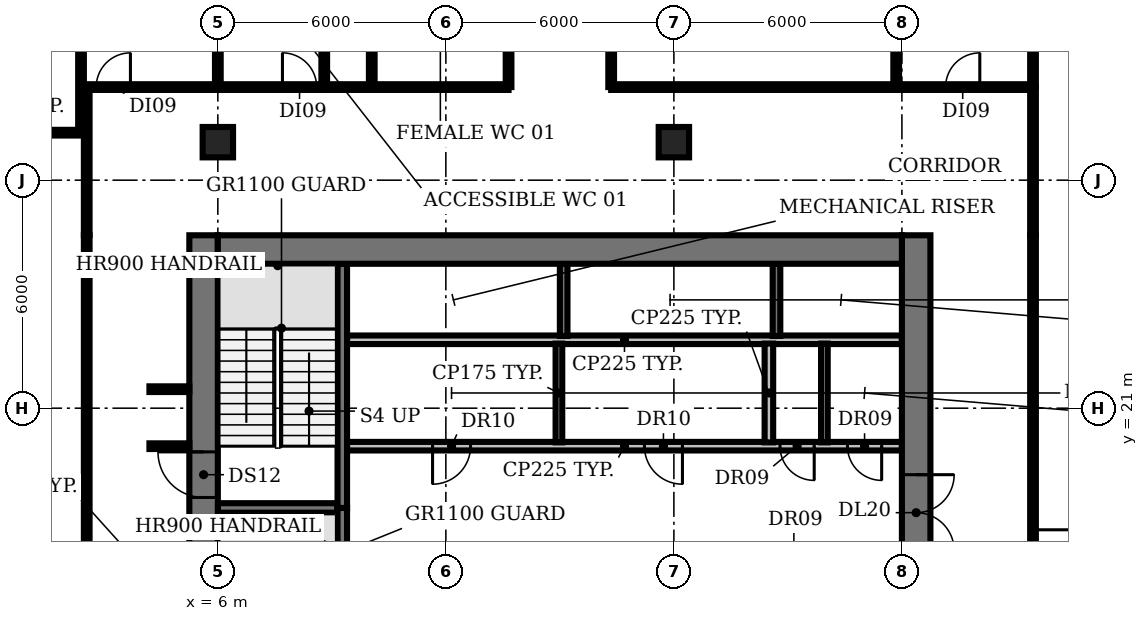
"""IFC4 building model, lengths in metres.
Left out: names, types, materials, properties, quantities, classifications, styles, units other than length and angle.
Written with IfcOpenShell. Run it as: python <this file> out.ifc"""

import sys

from ifc_helpers import new_model, si_unit, direction, frame, frame_2d, origin, origin_2d, place, context, subcontext, project, spatial, rectangle, extrude, element, fill, save


model = new_model("IFC4")
c1 = context("Model", 3, precision=1e-05, world=origin(), true_north=direction((0.0, 1.0)))
c2 = subcontext(c1, "Body", "Model", "MODEL_VIEW")
j1 = project(units=[si_unit("LENGTHUNIT", "METRE"), si_unit("PLANEANGLEUNIT", "RADIAN")], contexts=[c1])
p1 = place(None, origin())
s1 = spatial("IfcSite", under=j1, at=p1, CompositionType="ELEMENT")
p2 = place(p1, origin())
s2 = spatial("IfcBuilding", under=s1, at=p2, CompositionType="ELEMENT")
p3 = place(p2, frame((0.0, 0.0, 113.0)))
s3 = spatial("IfcBuildingStorey", under=s2, at=p3, CompositionType="ELEMENT", Elevation=113.0)
for number, where, z_axis, x_axis in (
    (1, (6.0, 28.0, 0.0), (0.0, 0.0, 1.0), (1.0, 0.0, 0.0)),
    (2, (18.0, 28.0, 0.0), (0.0, 0.0, 1.0), (1.0, 0.0, 0.0)),
):
    element("IfcColumn", number, at=place(p3, frame(where, z_axis=z_axis, x_axis=x_axis)), inside=s3, PredefinedType="COLUMN", context=c2, shape_type="SweptSolid", body=[
        extrude(rectangle(XDim=0.8, YDim=0.8, at=origin_2d()), origin(), (0.0, 0.0, 1.0), 3.85),
    ])
p4 = place(p3, frame((6.0, 18.375, 0.0), z_axis=(0.0, 0.0, 1.0), x_axis=(1.0, 0.0, 0.0)))
e3 = element("IfcWall", 3, at=p4, inside=s3, PredefinedType="SHEAR", context=c2, shape_type="SweptSolid", body=[
    extrude(rectangle(XDim=3.15, YDim=0.25, at=frame_2d((1.575, 0.0))), origin(), (0.0, 0.0, 1.0), 3.85),
])
p5 = place(p3, frame((24.0, 20.0, 0.0), z_axis=(0.0, 0.0, 1.0), x_axis=(-1.0, 0.0, 0.0)))
e4 = element("IfcWall", 4, at=p5, inside=s3, PredefinedType="PARTITIONING", context=c2, shape_type="SweptSolid", body=[
    extrude(rectangle(XDim=14.6, YDim=0.225, at=frame_2d((7.3, 0.0))), origin(), (0.0, 0.0, 1.0), 3.85),
])
p6 = place(p5, frame((11.35, 0.0, 0.0)))
e5 = element("IfcOpeningElement", 5, at=p6, cuts=e4, PredefinedType="OPENING", context=c2, shape_type="SweptSolid", body=[
    extrude(rectangle(XDim=1.0, YDim=2.1, at=frame_2d((0.5, 1.05))), frame((0.0, 0.123, 0.0), z_axis=(0.0, -1.0, 0.0), x_axis=(1.0, 0.0, 0.0)), (0.0, 0.0, 1.0), 0.245),
])
p7 = place(p5, frame((5.775, 0.0, 0.0)))
e6 = element("IfcOpeningElement", 6, at=p7, cuts=e4, PredefinedType="OPENING", context=c2, shape_type="SweptSolid", body=[
    extrude(rectangle(XDim=1.0, YDim=2.1, at=frame_2d((0.5, 1.05))), frame((0.0, 0.123, 0.0), z_axis=(0.0, -1.0, 0.0), x_axis=(1.0, 0.0, 0.0)), (0.0, 0.0, 1.0), 0.245),
])
p8 = place(p5, frame((2.308, 0.0, 0.0)))
e7 = element("IfcOpeningElement", 7, at=p8, cuts=e4, PredefinedType="OPENING", context=c2, shape_type="SweptSolid", body=[
    extrude(rectangle(XDim=0.9, YDim=2.1, at=frame_2d((0.45, 1.05))), frame((0.0, 0.123, 0.0), z_axis=(0.0, -1.0, 0.0), x_axis=(1.0, 0.0, 0.0)), (0.0, 0.0, 1.0), 0.245),
])
p9 = place(p5, frame((0.532, 0.0, 0.0)))
e8 = element("IfcOpeningElement", 8, at=p9, cuts=e4, PredefinedType="OPENING", context=c2, shape_type="SweptSolid", body=[
    extrude(rectangle(XDim=0.9, YDim=2.1, at=frame_2d((0.45, 1.05))), frame((0.0, 0.123, 0.0), z_axis=(0.0, -1.0, 0.0), x_axis=(1.0, 0.0, 0.0)), (0.0, 0.0, 1.0), 0.245),
])
p10 = place(p3, frame((9.4, 22.8, 0.0), z_axis=(0.0, 0.0, 1.0), x_axis=(1.0, 0.0, 0.0)))
e9 = element("IfcWall", 9, at=p10, inside=s3, PredefinedType="PARTITIONING", context=c2, shape_type="SweptSolid", body=[
    extrude(rectangle(XDim=14.6, YDim=0.225, at=frame_2d((7.3, 0.0))), origin(), (0.0, 0.0, 1.0), 3.85),
])
p11 = place(p3, frame((9.275, 18.375, 0.0), z_axis=(0.0, 0.0, 1.0), x_axis=(0.0, -1.0, 0.0)))
e10 = element("IfcWall", 10, at=p11, inside=s3, PredefinedType="SHEAR", context=c2, shape_type="SweptSolid", body=[
    extrude(rectangle(XDim=6.55, YDim=0.25, at=frame_2d((3.275, 0.0))), origin(), (0.0, 0.0, 1.0), 3.85),
])
p12 = place(p11, frame((5.075, 0.0, 0.0)))
e11 = element("IfcOpeningElement", 11, at=p12, cuts=e10, PredefinedType="OPENING", context=c2, shape_type="SweptSolid", body=[
    extrude(rectangle(XDim=1.0, YDim=2.1, at=frame_2d((0.5, 1.05))), frame((0.0, 0.135, 0.0), z_axis=(0.0, -1.0, 0.0), x_axis=(1.0, 0.0, 0.0)), (0.0, 0.0, 1.0), 0.27),
])
p13 = place(p3, frame((9.275, 18.375, 0.0), z_axis=(0.0, 0.0, 1.0), x_axis=(0.0, 1.0, 0.0)))
e12 = element("IfcWall", 12, at=p13, inside=s3, PredefinedType="SHEAR", context=c2, shape_type="SweptSolid", body=[
    extrude(rectangle(XDim=6.425, YDim=0.25, at=frame_2d((3.212, 0.0))), origin(), (0.0, 0.0, 1.0), 3.85),
])
p14 = place(p3, frame((14.975, 20.1, 0.0), z_axis=(0.0, 0.0, 1.0), x_axis=(0.0, 1.0, 0.0)))
e13 = element("IfcWall", 13, at=p14, inside=s3, PredefinedType="PARTITIONING", context=c2, shape_type="SweptSolid", body=[
    extrude(rectangle(XDim=2.6, YDim=0.175, at=frame_2d((1.3, 0.0))), origin(), (0.0, 0.0, 1.0), 3.85),
])
p15 = place(p3, frame((15.1, 22.9, 0.0), z_axis=(0.0, 0.0, 1.0), x_axis=(0.0, 1.0, 0.0)))
e14 = element("IfcWall", 14, at=p15, inside=s3, PredefinedType="SHEAR", context=c2, shape_type="SweptSolid", body=[
    extrude(rectangle(XDim=1.9, YDim=0.2, at=frame_2d((0.95, 0.0))), origin(), (0.0, 0.0, 1.0), 3.85),
])
p16 = place(p3, frame((20.5, 20.1, 0.0), z_axis=(0.0, 0.0, 1.0), x_axis=(0.0, 1.0, 0.0)))
e15 = element("IfcWall", 15, at=p16, inside=s3, PredefinedType="PARTITIONING", context=c2, shape_type="SweptSolid", body=[
    extrude(rectangle(XDim=2.6, YDim=0.225, at=frame_2d((1.3, 0.0))), origin(), (0.0, 0.0, 1.0), 3.85),
])
p17 = place(p3, frame((20.7, 22.9, 0.0), z_axis=(0.0, 0.0, 1.0), x_axis=(0.0, 1.0, 0.0)))
e16 = element("IfcWall", 16, at=p17, inside=s3, PredefinedType="SHEAR", context=c2, shape_type="SweptSolid", body=[
    extrude(rectangle(XDim=1.9, YDim=0.2, at=frame_2d((0.95, 0.0))), origin(), (0.0, 0.0, 1.0), 3.85),
])
p18 = place(p3, frame((21.96, 20.1, 0.0), z_axis=(0.0, 0.0, 1.0), x_axis=(0.0, 1.0, 0.0)))
e17 = element("IfcWall", 17, at=p18, inside=s3, PredefinedType="PARTITIONING", context=c2, shape_type="SweptSolid", body=[
    extrude(rectangle(XDim=2.6, YDim=0.175, at=frame_2d((1.3, 0.0))), origin(), (0.0, 0.0, 1.0), 3.85),
])
p19 = place(p3, frame((5.625, 4.47, 0.0), z_axis=(0.0, 0.0, 1.0), x_axis=(0.0, 1.0, 0.0)))
e18 = element("IfcWall", 18, at=p19, inside=s3, PredefinedType="SHEAR", context=c2, shape_type="SweptSolid", body=[
    extrude(rectangle(XDim=21.08, YDim=0.75, at=frame_2d((10.54, 0.0))), origin(), (0.0, 0.0, 1.0), 3.85),
])
p20 = place(p19, frame((1.18, 0.0, 0.0)))
e19 = element("IfcOpeningElement", 19, at=p20, cuts=e18, PredefinedType="OPENING", context=c2, shape_type="SweptSolid", body=[
    extrude(rectangle(XDim=1.5, YDim=2.1, at=frame_2d((0.75, 1.05))), frame((0.0, 0.385, 0.0), z_axis=(0.0, -1.0, 0.0), x_axis=(1.0, 0.0, 0.0)), (0.0, 0.0, 1.0), 0.77),
])
p21 = place(p19, frame((7.63, 0.0, 0.0)))
e20 = element("IfcOpeningElement", 20, at=p21, cuts=e18, PredefinedType="OPENING", context=c2, shape_type="SweptSolid", body=[
    extrude(rectangle(XDim=1.2, YDim=2.1, at=frame_2d((0.6, 1.05))), frame((0.0, 0.385, 0.0), z_axis=(0.0, -1.0, 0.0), x_axis=(1.0, 0.0, 0.0)), (0.0, 0.0, 1.0), 0.77),
])
p22 = place(p19, frame((14.18, 0.0, 0.0)))
e21 = element("IfcOpeningElement", 21, at=p22, cuts=e18, PredefinedType="OPENING", context=c2, shape_type="SweptSolid", body=[
    extrude(rectangle(XDim=1.2, YDim=2.1, at=frame_2d((0.6, 1.05))), frame((0.0, 0.385, 0.0), z_axis=(0.0, -1.0, 0.0), x_axis=(1.0, 0.0, 0.0)), (0.0, 0.0, 1.0), 0.77),
])
p23 = place(p3, frame((24.375, 25.55, 0.0), z_axis=(0.0, 0.0, 1.0), x_axis=(0.0, -1.0, 0.0)))
e22 = element("IfcWall", 22, at=p23, inside=s3, PredefinedType="SHEAR", context=c2, shape_type="SweptSolid", body=[
    extrude(rectangle(XDim=21.13, YDim=0.75, at=frame_2d((10.565, 0.0))), origin(), (0.0, 0.0, 1.0), 3.85),
])
p24 = place(p23, frame((18.4, 0.0, 0.0)))
e23 = element("IfcOpeningElement", 23, at=p24, cuts=e22, PredefinedType="OPENING", context=c2, shape_type="SweptSolid", body=[
    extrude(rectangle(XDim=1.5, YDim=2.1, at=frame_2d((0.75, 1.05))), frame((0.0, 0.385, 0.0), z_axis=(0.0, -1.0, 0.0), x_axis=(1.0, 0.0, 0.0)), (0.0, 0.0, 1.0), 0.77),
])
p25 = place(p23, frame((12.3, 0.0, 0.0)))
e24 = element("IfcOpeningElement", 24, at=p25, cuts=e22, PredefinedType="OPENING", context=c2, shape_type="SweptSolid", body=[
    extrude(rectangle(XDim=0.9, YDim=2.1, at=frame_2d((0.45, 1.05))), frame((0.0, 0.385, 0.0), z_axis=(0.0, -1.0, 0.0), x_axis=(1.0, 0.0, 0.0)), (0.0, 0.0, 1.0), 0.77),
])
p26 = place(p23, frame((6.3, 0.0, 0.0)))
e25 = element("IfcOpeningElement", 25, at=p26, cuts=e22, PredefinedType="OPENING", context=c2, shape_type="SweptSolid", body=[
    extrude(rectangle(XDim=2.0, YDim=2.1, at=frame_2d((1.0, 1.05))), frame((0.0, 0.385, 0.0), z_axis=(0.0, -1.0, 0.0), x_axis=(1.0, 0.0, 0.0)), (0.0, 0.0, 1.0), 0.77),
])
p27 = place(p3, frame((6.0, 25.175, 0.0), z_axis=(0.0, 0.0, 1.0), x_axis=(1.0, 0.0, 0.0)))
e26 = element("IfcWall", 26, at=p27, inside=s3, PredefinedType="SHEAR", context=c2, shape_type="SweptSolid", body=[
    extrude(rectangle(XDim=18.0, YDim=0.75, at=frame_2d((9.0, 0.0))), origin(), (0.0, 0.0, 1.0), 3.85),
])
p28 = place(p3, frame((-1.02, 28.25, 0.0), z_axis=(0.0, 0.0, 1.0), x_axis=(1.0, 0.0, 0.0)))
e27 = element("IfcWall", 27, at=p28, inside=s3, PredefinedType="PARTITIONING", context=c2, shape_type="SweptSolid", body=[
    extrude(rectangle(XDim=3.42, YDim=0.15, at=frame_2d((1.71, 0.0))), origin(), (0.0, 0.0, 1.0), 2.83),
])
p29 = place(p3, frame((2.4, 28.25, 0.0), z_axis=(0.0, 0.0, 1.0), x_axis=(0.0, 1.0, 0.0)))
e28 = element("IfcWall", 28, at=p29, inside=s3, PredefinedType="PARTITIONING", context=c2, shape_type="SweptSolid", body=[
    extrude(rectangle(XDim=6.0, YDim=0.15, at=frame_2d((3.0, 0.0))), origin(), (0.0, 0.0, 1.0), 2.83),
])
p30 = place(p3, frame((2.55, 6.07, 0.0), z_axis=(0.0, 0.0, 1.0), x_axis=(0.0, 1.0, 0.0)))
e29 = element("IfcWall", 29, at=p30, inside=s3, PredefinedType="PARTITIONING", context=c2, shape_type="SweptSolid", body=[
    extrude(rectangle(XDim=19.48, YDim=0.15, at=frame_2d((9.74, 0.0))), origin(), (0.0, 0.0, 1.0), 2.83),
])
p31 = place(p30, frame((7.58, 0.0, 0.0)))
e30 = element("IfcOpeningElement", 30, at=p31, cuts=e29, PredefinedType="OPENING", context=c2, shape_type="SweptSolid", body=[
    extrude(rectangle(XDim=1.2, YDim=2.1, at=frame_2d((0.6, 1.05))), frame((0.0, 0.085, 0.0), z_axis=(0.0, -1.0, 0.0), x_axis=(1.0, 0.0, 0.0)), (0.0, 0.0, 1.0), 0.17),
])
p32 = place(p3, frame((2.55, 25.55, 0.0), z_axis=(0.0, 0.0, 1.0), x_axis=(0.0, 1.0, 0.0)))
e31 = element("IfcWall", 31, at=p32, inside=s3, PredefinedType="PARTITIONING", context=c2, shape_type="SweptSolid", body=[
    extrude(rectangle(XDim=3.9, YDim=0.15, at=frame_2d((1.95, 0.0))), origin(), (0.0, 0.0, 1.0), 2.83),
])
p33 = place(p3, frame((2.55, 29.45, 0.0), z_axis=(0.0, 0.0, 1.0), x_axis=(1.0, 0.0, 0.0)))
e32 = element("IfcWall", 32, at=p33, inside=s3, PredefinedType="PARTITIONING", context=c2, shape_type="SweptSolid", body=[
    extrude(rectangle(XDim=3.45, YDim=0.15, at=frame_2d((1.725, 0.0))), origin(), (0.0, 0.0, 1.0), 2.83),
])
p34 = place(p33, frame((0.25, 0.0, 0.0)))
e33 = element("IfcOpeningElement", 33, at=p34, cuts=e32, PredefinedType="OPENING", context=c2, shape_type="SweptSolid", body=[
    extrude(rectangle(XDim=0.9, YDim=2.1, at=frame_2d((0.45, 1.05))), frame((0.0, 0.085, 0.0), z_axis=(0.0, -1.0, 0.0), x_axis=(1.0, 0.0, 0.0)), (0.0, 0.0, 1.0), 0.17),
])
for number, where, z_axis, x_axis in (
    (34, (4.2, 20.0, 0.0), (0.0, 0.0, 1.0), (1.0, 0.0, 0.0)),
    (35, (4.2, 21.5, 0.0), (0.0, 0.0, 1.0), (1.0, 0.0, 0.0)),
):
    element("IfcWall", number, at=place(p3, frame(where, z_axis=z_axis, x_axis=x_axis)), inside=s3, PredefinedType="PARTITIONING", context=c2, shape_type="SweptSolid", body=[
        extrude(rectangle(XDim=1.05, YDim=0.15, at=frame_2d((0.525, 0.0))), origin(), (0.0, 0.0, 1.0), 2.83),
    ])
p35 = place(p3, frame((6.0, 29.45, 0.0), z_axis=(0.0, 0.0, 1.0), x_axis=(0.0, 1.0, 0.0)))
e36 = element("IfcWall", 36, at=p35, inside=s3, PredefinedType="PARTITIONING", context=c2, shape_type="SweptSolid", body=[
    extrude(rectangle(XDim=4.8, YDim=0.15, at=frame_2d((2.4, 0.0))), origin(), (0.0, 0.0, 1.0), 2.83),
])
p36 = place(p3, frame((6.0, 29.45, 0.0), z_axis=(0.0, 0.0, 1.0), x_axis=(1.0, 0.0, 0.0)))
e37 = element("IfcWall", 37, at=p36, inside=s3, PredefinedType="PARTITIONING", context=c2, shape_type="SweptSolid", body=[
    extrude(rectangle(XDim=2.8, YDim=0.15, at=frame_2d((1.4, 0.0))), origin(), (0.0, 0.0, 1.0), 2.83),
])
p37 = place(p36, frame((1.7, 0.0, 0.0)))
e38 = element("IfcOpeningElement", 38, at=p37, cuts=e37, PredefinedType="OPENING", context=c2, shape_type="SweptSolid", body=[
    extrude(rectangle(XDim=0.9, YDim=2.1, at=frame_2d((0.45, 1.05))), frame((0.0, 0.085, 0.0), z_axis=(0.0, -1.0, 0.0), x_axis=(1.0, 0.0, 0.0)), (0.0, 0.0, 1.0), 0.17),
])
p38 = place(p3, frame((8.8, 29.45, 0.0), z_axis=(0.0, 0.0, 1.0), x_axis=(0.0, 1.0, 0.0)))
e39 = element("IfcWall", 39, at=p38, inside=s3, PredefinedType="PARTITIONING", context=c2, shape_type="SweptSolid", body=[
    extrude(rectangle(XDim=4.8, YDim=0.15, at=frame_2d((2.4, 0.0))), origin(), (0.0, 0.0, 1.0), 2.83),
])
p39 = place(p3, frame((8.8, 29.45, 0.0), z_axis=(0.0, 0.0, 1.0), x_axis=(1.0, 0.0, 0.0)))
e40 = element("IfcWall", 40, at=p39, inside=s3, PredefinedType="PARTITIONING", context=c2, shape_type="SweptSolid", body=[
    extrude(rectangle(XDim=4.85, YDim=0.15, at=frame_2d((2.425, 0.0))), origin(), (0.0, 0.0, 1.0), 2.83),
])
p40 = place(p3, frame((10.05, 29.45, 0.0), z_axis=(0.0, 0.0, 1.0), x_axis=(0.0, 1.0, 0.0)))
e41 = element("IfcWall", 41, at=p40, inside=s3, PredefinedType="PARTITIONING", context=c2, shape_type="SweptSolid", body=[
    extrude(rectangle(XDim=4.8, YDim=0.15, at=frame_2d((2.4, 0.0))), origin(), (0.0, 0.0, 1.0), 2.83),
])
p41 = place(p3, frame((13.65, 29.45, 0.0), z_axis=(0.0, 0.0, 1.0), x_axis=(0.0, 1.0, 0.0)))
e42 = element("IfcWall", 42, at=p41, inside=s3, PredefinedType="PARTITIONING", context=c2, shape_type="SweptSolid", body=[
    extrude(rectangle(XDim=4.8, YDim=0.15, at=frame_2d((2.4, 0.0))), origin(), (0.0, 0.0, 1.0), 2.83),
])
p42 = place(p41, frame((1.9, 0.0, 0.0)))
e43 = element("IfcOpeningElement", 43, at=p42, cuts=e42, PredefinedType="OPENING", context=c2, shape_type="SweptSolid", body=[
    extrude(rectangle(XDim=0.9, YDim=2.1, at=frame_2d((0.45, 1.05))), frame((0.0, 0.085, 0.0), z_axis=(0.0, -1.0, 0.0), x_axis=(1.0, 0.0, 0.0)), (0.0, 0.0, 1.0), 0.17),
])
p43 = place(p3, frame((16.35, 29.45, 0.0), z_axis=(0.0, 0.0, 1.0), x_axis=(0.0, 1.0, 0.0)))
e44 = element("IfcWall", 44, at=p43, inside=s3, PredefinedType="PARTITIONING", context=c2, shape_type="SweptSolid", body=[
    extrude(rectangle(XDim=4.8, YDim=0.15, at=frame_2d((2.4, 0.0))), origin(), (0.0, 0.0, 1.0), 2.83),
])
p44 = place(p3, frame((16.35, 29.45, 0.0), z_axis=(0.0, 0.0, 1.0), x_axis=(1.0, 0.0, 0.0)))
e45 = element("IfcWall", 45, at=p44, inside=s3, PredefinedType="PARTITIONING", context=c2, shape_type="SweptSolid", body=[
    extrude(rectangle(XDim=7.5, YDim=0.15, at=frame_2d((3.75, 0.0))), origin(), (0.0, 0.0, 1.0), 2.83),
])
p45 = place(p3, frame((23.85, 29.45, 0.0), z_axis=(0.0, 0.0, 1.0), x_axis=(0.0, 1.0, 0.0)))
e46 = element("IfcWall", 46, at=p45, inside=s3, PredefinedType="PARTITIONING", context=c2, shape_type="SweptSolid", body=[
    extrude(rectangle(XDim=4.8, YDim=0.15, at=frame_2d((2.4, 0.0))), origin(), (0.0, 0.0, 1.0), 2.83),
])
p46 = place(p3, frame((23.85, 29.45, 0.0), z_axis=(0.0, 0.0, 1.0), x_axis=(1.0, 0.0, 0.0)))
e47 = element("IfcWall", 47, at=p46, inside=s3, PredefinedType="PARTITIONING", context=c2, shape_type="SweptSolid", body=[
    extrude(rectangle(XDim=3.6, YDim=0.15, at=frame_2d((1.8, 0.0))), origin(), (0.0, 0.0, 1.0), 2.83),
])
p47 = place(p46, frame((1.3, 0.0, 0.0)))
e48 = element("IfcOpeningElement", 48, at=p47, cuts=e47, PredefinedType="OPENING", context=c2, shape_type="SweptSolid", body=[
    extrude(rectangle(XDim=0.9, YDim=2.1, at=frame_2d((0.45, 1.05))), frame((0.0, 0.085, 0.0), z_axis=(0.0, -1.0, 0.0), x_axis=(1.0, 0.0, 0.0)), (0.0, 0.0, 1.0), 0.17),
])
p48 = place(p3, frame((27.45, 25.55, 0.0), z_axis=(0.0, 0.0, 1.0), x_axis=(0.0, -1.0, 0.0)))
e49 = element("IfcWall", 49, at=p48, inside=s3, PredefinedType="PARTITIONING", context=c2, shape_type="SweptSolid", body=[
    extrude(rectangle(XDim=16.45, YDim=0.15, at=frame_2d((8.225, 0.0))), origin(), (0.0, 0.0, 1.0), 2.83),
])
p49 = place(p48, frame((7.75, 0.0, 0.0)))
e50 = element("IfcOpeningElement", 50, at=p49, cuts=e49, PredefinedType="OPENING", context=c2, shape_type="SweptSolid", body=[
    extrude(rectangle(XDim=1.0, YDim=2.1, at=frame_2d((0.5, 1.05))), frame((0.0, 0.085, 0.0), z_axis=(0.0, -1.0, 0.0), x_axis=(1.0, 0.0, 0.0)), (0.0, 0.0, 1.0), 0.17),
])
p50 = place(p3, frame((27.45, 25.55, 0.0), z_axis=(0.0, 0.0, 1.0), x_axis=(0.0, 1.0, 0.0)))
e51 = element("IfcWall", 51, at=p50, inside=s3, PredefinedType="PARTITIONING", context=c2, shape_type="SweptSolid", body=[
    extrude(rectangle(XDim=3.9, YDim=0.15, at=frame_2d((1.95, 0.0))), origin(), (0.0, 0.0, 1.0), 2.83),
])
p51 = place(p3, frame((27.45, 29.45, 0.0), z_axis=(0.0, 0.0, 1.0), x_axis=(0.0, 1.0, 0.0)))
e52 = element("IfcWall", 52, at=p51, inside=s3, PredefinedType="PARTITIONING", context=c2, shape_type="SweptSolid", body=[
    extrude(rectangle(XDim=2.49, YDim=0.15, at=frame_2d((1.245, 0.0))), origin(), (0.0, 0.0, 1.0), 2.83),
])
p52 = place(p6, origin())
e53 = element("IfcDoor", 53, at=p52, inside=s3, OperationType="SINGLE_SWING_RIGHT", PredefinedType="DOOR", context=c2, shape_type="SweptSolid", body=[
    extrude(rectangle(XDim=1.0, YDim=2.1, at=frame_2d((0.5, 1.05))), frame((0.0, 0.025, 0.0), z_axis=(0.0, -1.0, 0.0), x_axis=(1.0, 0.0, 0.0)), (0.0, 0.0, 1.0), 0.05),
])
fill(e5, e53)
p53 = place(p7, origin())
e54 = element("IfcDoor", 54, at=p53, inside=s3, OperationType="SINGLE_SWING_LEFT", PredefinedType="DOOR", context=c2, shape_type="SweptSolid", body=[
    extrude(rectangle(XDim=1.0, YDim=2.1, at=frame_2d((0.5, 1.05))), frame((0.0, 0.025, 0.0), z_axis=(0.0, -1.0, 0.0), x_axis=(1.0, 0.0, 0.0)), (0.0, 0.0, 1.0), 0.05),
])
fill(e6, e54)
p54 = place(p8, origin())
e55 = element("IfcDoor", 55, at=p54, inside=s3, OperationType="SINGLE_SWING_LEFT", PredefinedType="DOOR", context=c2, shape_type="SweptSolid", body=[
    extrude(rectangle(XDim=0.9, YDim=2.1, at=frame_2d((0.45, 1.05))), frame((0.0, 0.025, 0.0), z_axis=(0.0, -1.0, 0.0), x_axis=(1.0, 0.0, 0.0)), (0.0, 0.0, 1.0), 0.05),
])
fill(e7, e55)
p55 = place(p9, origin())
e56 = element("IfcDoor", 56, at=p55, inside=s3, OperationType="SINGLE_SWING_LEFT", PredefinedType="DOOR", context=c2, shape_type="SweptSolid", body=[
    extrude(rectangle(XDim=0.9, YDim=2.1, at=frame_2d((0.45, 1.05))), frame((0.0, 0.025, 0.0), z_axis=(0.0, -1.0, 0.0), x_axis=(1.0, 0.0, 0.0)), (0.0, 0.0, 1.0), 0.05),
])
fill(e8, e56)
p56 = place(p22, origin())
e57 = element("IfcDoor", 57, at=p56, inside=s3, OperationType="SINGLE_SWING_RIGHT", PredefinedType="DOOR", context=c2, shape_type="SweptSolid", body=[
    extrude(rectangle(XDim=1.2, YDim=2.1, at=frame_2d((0.6, 1.05))), frame((0.0, 0.025, 0.0), z_axis=(0.0, -1.0, 0.0), x_axis=(1.0, 0.0, 0.0)), (0.0, 0.0, 1.0), 0.05),
])
fill(e21, e57)
p57 = place(p26, origin())
e58 = element("IfcDoor", 58, at=p57, inside=s3, OperationType="DOUBLE_DOOR_SINGLE_SWING", PredefinedType="DOOR", context=c2, shape_type="SweptSolid", body=[
    extrude(rectangle(XDim=2.0, YDim=2.1, at=frame_2d((1.0, 1.05))), frame((0.0, 0.025, 0.0), z_axis=(0.0, -1.0, 0.0), x_axis=(1.0, 0.0, 0.0)), (0.0, 0.0, 1.0), 0.05),
])
fill(e25, e58)
p58 = place(p34, origin())
e59 = element("IfcDoor", 59, at=p58, inside=s3, OperationType="SINGLE_SWING_RIGHT", PredefinedType="DOOR", context=c2, shape_type="SweptSolid", body=[
    extrude(rectangle(XDim=0.9, YDim=2.1, at=frame_2d((0.45, 1.05))), frame((0.0, 0.025, 0.0), z_axis=(0.0, -1.0, 0.0), x_axis=(1.0, 0.0, 0.0)), (0.0, 0.0, 1.0), 0.05),
])
fill(e33, e59)
p59 = place(p37, origin())
e60 = element("IfcDoor", 60, at=p59, inside=s3, OperationType="SINGLE_SWING_LEFT", PredefinedType="DOOR", context=c2, shape_type="SweptSolid", body=[
    extrude(rectangle(XDim=0.9, YDim=2.1, at=frame_2d((0.45, 1.05))), frame((0.0, 0.025, 0.0), z_axis=(0.0, -1.0, 0.0), x_axis=(1.0, 0.0, 0.0)), (0.0, 0.0, 1.0), 0.05),
])
fill(e38, e60)
p60 = place(p47, origin())
e61 = element("IfcDoor", 61, at=p60, inside=s3, OperationType="SINGLE_SWING_RIGHT", PredefinedType="DOOR", context=c2, shape_type="SweptSolid", body=[
    extrude(rectangle(XDim=0.9, YDim=2.1, at=frame_2d((0.45, 1.05))), frame((0.0, 0.025, 0.0), z_axis=(0.0, -1.0, 0.0), x_axis=(1.0, 0.0, 0.0)), (0.0, 0.0, 1.0), 0.05),
])
fill(e48, e61)
p61 = place(p49, origin())
e62 = element("IfcDoor", 62, at=p61, inside=s3, OperationType="SINGLE_SWING_LEFT", PredefinedType="DOOR", context=c2, shape_type="SweptSolid", body=[
    extrude(rectangle(XDim=1.0, YDim=2.1, at=frame_2d((0.5, 1.05))), frame((0.0, 0.025, 0.0), z_axis=(0.0, -1.0, 0.0), x_axis=(1.0, 0.0, 0.0)), (0.0, 0.0, 1.0), 0.05),
])
fill(e50, e62)
save(model, sys.argv[1])
